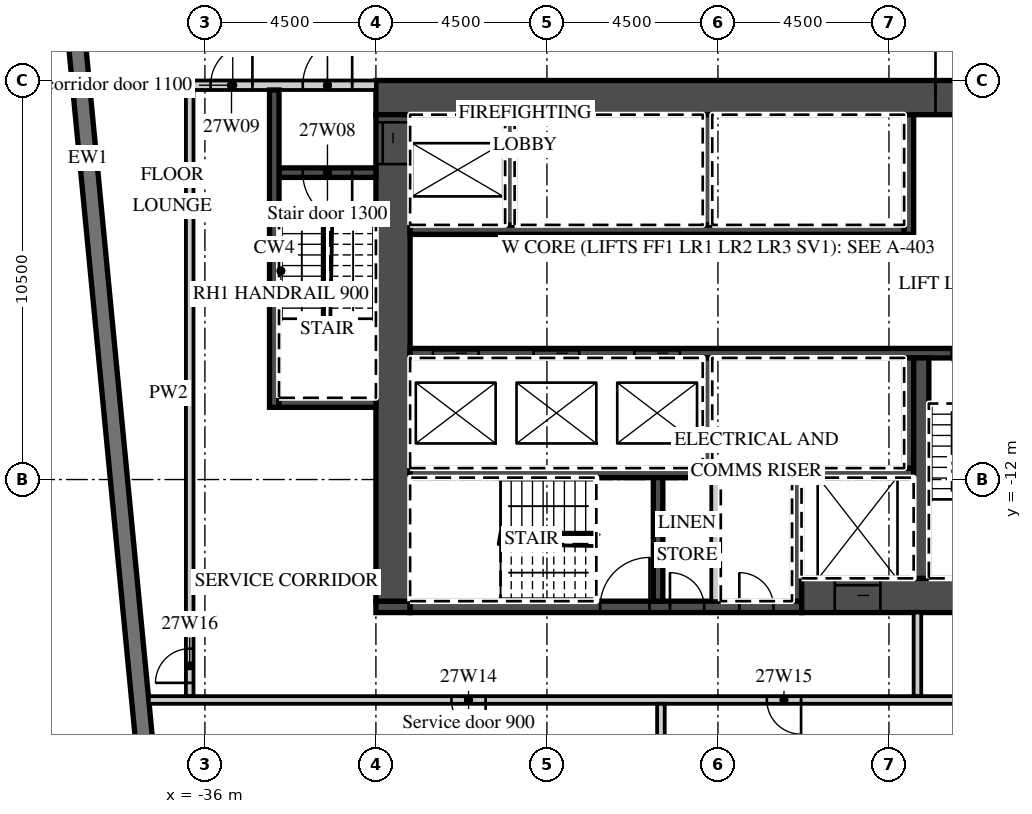
"""IFC4 building model, lengths in metres.
Left out: names, types, materials, properties, quantities, classifications, styles, units other than length and angle.
Written with IfcOpenShell. Run it as: python <this file> out.ifc"""

import sys

from ifc_helpers import new_model, si_unit, direction, frame, frame_2d, origin, place, context, subcontext, project, spatial, rectangle, extrude, element, fill, save


model = new_model("IFC4")
c1 = context("Model", 3, precision=1e-05, world=origin(), true_north=direction((0.0, 1.0)))
c2 = subcontext(c1, "Body", "Model", "MODEL_VIEW")
j1 = project(units=[si_unit("LENGTHUNIT", "METRE"), si_unit("PLANEANGLEUNIT", "RADIAN")], contexts=[c1])
p1 = place(None, origin())
s1 = spatial("IfcSite", under=j1, at=p1, CompositionType="ELEMENT")
p2 = place(p1, origin())
s2 = spatial("IfcBuilding", under=s1, at=p2, CompositionType="ELEMENT")
p3 = place(p2, frame((0.0, 0.0, 124.0)))
s3 = spatial("IfcBuildingStorey", under=s2, at=p3, CompositionType="ELEMENT", Elevation=124.0)
p4 = place(p3, frame((-40.753, 13.872, 0.0), z_axis=(0.0, 0.0, 1.0), x_axis=(0.095843327381, -0.995396431878, 0.0)))
e1 = element("IfcWall", 1, at=p4, inside=s3, PredefinedType="SOLIDWALL", context=c2, shape_type="SweptSolid", body=[
    extrude(rectangle(XDim=35.0, YDim=0.45, at=frame_2d((17.5, 0.0))), origin(), (0.0, 0.0, 1.0), 3.02),
])
p5 = place(p4, frame((4.277, 0.0, 0.45)))
e2 = element("IfcOpeningElement", 2, at=p5, cuts=e1, PredefinedType="OPENING", context=c2, shape_type="SweptSolid", body=[
    extrude(rectangle(XDim=3.3, YDim=2.25, at=frame_2d((1.65, 1.125))), frame((0.0, 0.235, 0.0), z_axis=(0.0, -1.0, 0.0), x_axis=(1.0, 0.0, 0.0)), (0.0, 0.0, 1.0), 0.47),
])
p6 = place(p4, frame((8.798, 0.0, 0.45)))
e3 = element("IfcOpeningElement", 3, at=p6, cuts=e1, PredefinedType="OPENING", context=c2, shape_type="SweptSolid", body=[
    extrude(rectangle(XDim=3.3, YDim=2.25, at=frame_2d((1.65, 1.125))), frame((0.0, 0.235, 0.0), z_axis=(0.0, -1.0, 0.0), x_axis=(1.0, 0.0, 0.0)), (0.0, 0.0, 1.0), 0.47),
])
p7 = place(p3, frame((-31.5, -1.95, 0.0), z_axis=(0.0, 0.0, 1.0), x_axis=(1.0, 0.0, 0.0)))
e4 = element("IfcWall", 4, at=p7, inside=s3, PredefinedType="SHEAR", context=c2, shape_type="SweptSolid", body=[
    extrude(rectangle(XDim=18.0, YDim=0.9, at=frame_2d((9.0, 0.0))), origin(), (0.0, 0.0, 1.0), 3.02),
])
p8 = place(p7, frame((14.725, 0.0, 0.0)))
e5 = element("IfcOpeningElement", 5, at=p8, cuts=e4, PredefinedType="OPENING", context=c2, shape_type="SweptSolid", body=[
    extrude(rectangle(XDim=1.8, YDim=2.1, at=frame_2d((0.9, 1.05))), frame((0.0, 0.46, 0.0), z_axis=(0.0, -1.0, 0.0), x_axis=(1.0, 0.0, 0.0)), (0.0, 0.0, 1.0), 0.92),
])
p9 = place(p3, frame((-20.3, -15.05, 0.0), z_axis=(0.0, 0.0, 1.0), x_axis=(1.0, 0.0, 0.0)))
e6 = element("IfcWall", 6, at=p9, inside=s3, PredefinedType="SHEAR", context=c2, shape_type="SweptSolid", body=[
    extrude(rectangle(XDim=6.8, YDim=0.9, at=frame_2d((3.4, 0.0))), origin(), (0.0, 0.0, 1.0), 3.02),
])
p10 = place(p9, frame((0.875, 0.0, 0.0)))
e7 = element("IfcOpeningElement", 7, at=p10, cuts=e6, PredefinedType="OPENING", context=c2, shape_type="SweptSolid", body=[
    extrude(rectangle(XDim=1.2, YDim=2.1, at=frame_2d((0.6, 1.05))), frame((0.0, 0.46, 0.0), z_axis=(0.0, -1.0, 0.0), x_axis=(1.0, 0.0, 0.0)), (0.0, 0.0, 1.0), 0.92),
])
p11 = place(p3, frame((-31.5, -15.35, 0.0), z_axis=(0.0, 0.0, 1.0), x_axis=(1.0, 0.0, 0.0)))
e8 = element("IfcWall", 8, at=p11, inside=s3, PredefinedType="SHEAR", context=c2, shape_type="SweptSolid", body=[
    extrude(rectangle(XDim=0.9, YDim=0.3, at=frame_2d((0.45, 0.0))), origin(), (0.0, 0.0, 1.0), 3.02),
])
p12 = place(p3, frame((-30.6, -15.35, 0.0), z_axis=(0.0, 0.0, 1.0), x_axis=(1.0, 0.0, 0.0)))
e9 = element("IfcWall", 9, at=p12, inside=s3, PredefinedType="SHEAR", context=c2, shape_type="SweptSolid", body=[
    extrude(rectangle(XDim=10.3, YDim=0.3, at=frame_2d((5.15, 0.0))), origin(), (0.0, 0.0, 1.0), 3.02),
])
p13 = place(p12, frame((5.0, 0.0, 0.0)))
e10 = element("IfcOpeningElement", 10, at=p13, cuts=e9, PredefinedType="OPENING", context=c2, shape_type="SweptSolid", body=[
    extrude(rectangle(XDim=1.3, YDim=2.1, at=frame_2d((0.65, 1.05))), frame((0.0, 0.16, 0.0), z_axis=(0.0, -1.0, 0.0), x_axis=(1.0, 0.0, 0.0)), (0.0, 0.0, 1.0), 0.32),
])
p14 = place(p12, frame((6.837, 0.0, 0.0)))
e11 = element("IfcOpeningElement", 11, at=p14, cuts=e9, PredefinedType="OPENING", context=c2, shape_type="SweptSolid", body=[
    extrude(rectangle(XDim=0.9, YDim=2.1, at=frame_2d((0.45, 1.05))), frame((0.0, 0.16, 0.0), z_axis=(0.0, -1.0, 0.0), x_axis=(1.0, 0.0, 0.0)), (0.0, 0.0, 1.0), 0.32),
])
p15 = place(p12, frame((8.663, 0.0, 0.0)))
e12 = element("IfcOpeningElement", 12, at=p15, cuts=e9, PredefinedType="OPENING", context=c2, shape_type="SweptSolid", body=[
    extrude(rectangle(XDim=0.9, YDim=2.1, at=frame_2d((0.45, 1.05))), frame((0.0, 0.16, 0.0), z_axis=(0.0, -1.0, 0.0), x_axis=(1.0, 0.0, 0.0)), (0.0, 0.0, 1.0), 0.32),
])
p16 = place(p3, frame((-31.05, -15.2, 0.0), z_axis=(0.0, 0.0, 1.0), x_axis=(0.0, 1.0, 0.0)))
e13 = element("IfcWall", 13, at=p16, inside=s3, PredefinedType="SHEAR", context=c2, shape_type="SweptSolid", body=[
    extrude(rectangle(XDim=12.8, YDim=0.9, at=frame_2d((6.4, 0.0))), origin(), (0.0, 0.0, 1.0), 3.02),
])
p17 = place(p16, frame((11.5, 0.0, 0.0)))
e14 = element("IfcOpeningElement", 14, at=p17, cuts=e13, PredefinedType="OPENING", context=c2, shape_type="SweptSolid", body=[
    extrude(rectangle(XDim=1.1, YDim=2.1, at=frame_2d((0.55, 1.05))), frame((0.0, 0.46, 0.0), z_axis=(0.0, -1.0, 0.0), x_axis=(1.0, 0.0, 0.0)), (0.0, 0.0, 1.0), 0.92),
])
p18 = place(p3, frame((-30.6, -5.425, 0.0), z_axis=(0.0, 0.0, 1.0), x_axis=(1.0, 0.0, 0.0)))
e15 = element("IfcWall", 15, at=p18, inside=s3, PredefinedType="SHEAR", context=c2, shape_type="SweptSolid", body=[
    extrude(rectangle(XDim=13.0, YDim=0.25, at=frame_2d((6.5, 0.0))), origin(), (0.0, 0.0, 1.0), 3.02),
])
p19 = place(p3, frame((-17.475, -5.55, 0.0), z_axis=(0.0, 0.0, 1.0), x_axis=(0.0, 1.0, 0.0)))
e16 = element("IfcWall", 16, at=p19, inside=s3, PredefinedType="SHEAR", context=c2, shape_type="SweptSolid", body=[
    extrude(rectangle(XDim=3.15, YDim=0.25, at=frame_2d((1.575, 0.0))), origin(), (0.0, 0.0, 1.0), 3.02),
])
for number, where, z_axis, x_axis in (
    (17, (-27.975, -5.3, 0.0), (0.0, 0.0, 1.0), (0.0, 1.0, 0.0)),
    (18, (-22.775, -5.3, 0.0), (0.0, 0.0, 1.0), (0.0, 1.0, 0.0)),
):
    element("IfcWall", number, at=place(p3, frame(where, z_axis=z_axis, x_axis=x_axis)), inside=s3, PredefinedType="SHEAR", context=c2, shape_type="SweptSolid", body=[
        extrude(rectangle(XDim=2.9, YDim=0.25, at=frame_2d((1.45, 0.0))), origin(), (0.0, 0.0, 1.0), 3.02),
    ])
p20 = place(p3, frame((-30.6, -8.675, 0.0), z_axis=(0.0, 0.0, 1.0), x_axis=(1.0, 0.0, 0.0)))
e19 = element("IfcWall", 19, at=p20, inside=s3, PredefinedType="SHEAR", context=c2, shape_type="SweptSolid", body=[
    extrude(rectangle(XDim=16.2, YDim=0.25, at=frame_2d((8.1, 0.0))), origin(), (0.0, 0.0, 1.0), 3.02),
])
p21 = place(p20, frame((0.6, 0.0, 0.0)))
e20 = element("IfcOpeningElement", 20, at=p21, cuts=e19, PredefinedType="OPENING", context=c2, shape_type="SweptSolid", body=[
    extrude(rectangle(XDim=1.2, YDim=2.1, at=frame_2d((0.6, 1.05))), frame((0.0, 0.135, 0.0), z_axis=(0.0, -1.0, 0.0), x_axis=(1.0, 0.0, 0.0)), (0.0, 0.0, 1.0), 0.27),
])
p22 = place(p20, frame((3.25, 0.0, 0.0)))
e21 = element("IfcOpeningElement", 21, at=p22, cuts=e19, PredefinedType="OPENING", context=c2, shape_type="SweptSolid", body=[
    extrude(rectangle(XDim=1.2, YDim=2.1, at=frame_2d((0.6, 1.05))), frame((0.0, 0.135, 0.0), z_axis=(0.0, -1.0, 0.0), x_axis=(1.0, 0.0, 0.0)), (0.0, 0.0, 1.0), 0.27),
])
p23 = place(p20, frame((5.9, 0.0, 0.0)))
e22 = element("IfcOpeningElement", 22, at=p23, cuts=e19, PredefinedType="OPENING", context=c2, shape_type="SweptSolid", body=[
    extrude(rectangle(XDim=1.2, YDim=2.1, at=frame_2d((0.6, 1.05))), frame((0.0, 0.135, 0.0), z_axis=(0.0, -1.0, 0.0), x_axis=(1.0, 0.0, 0.0)), (0.0, 0.0, 1.0), 0.27),
])
p24 = place(p20, frame((14.25, 0.0, 0.0)))
e23 = element("IfcOpeningElement", 23, at=p24, cuts=e19, PredefinedType="OPENING", context=c2, shape_type="SweptSolid", body=[
    extrude(rectangle(XDim=1.3, YDim=2.1, at=frame_2d((0.65, 1.05))), frame((0.0, 0.135, 0.0), z_axis=(0.0, -1.0, 0.0), x_axis=(1.0, 0.0, 0.0)), (0.0, 0.0, 1.0), 0.27),
])
p25 = place(p3, frame((-30.6, -11.825, 0.0), z_axis=(0.0, 0.0, 1.0), x_axis=(1.0, 0.0, 0.0)))
e24 = element("IfcWall", 24, at=p25, inside=s3, PredefinedType="SHEAR", context=c2, shape_type="SweptSolid", body=[
    extrude(rectangle(XDim=13.25, YDim=0.25, at=frame_2d((6.625, 0.0))), origin(), (0.0, 0.0, 1.0), 3.02),
])
for number, where, z_axis, x_axis in (
    (25, (-17.475, -11.7, 0.0), (0.0, 0.0, 1.0), (0.0, 1.0, 0.0)),
    (26, (-22.775, -11.7, 0.0), (0.0, 0.0, 1.0), (0.0, 1.0, 0.0)),
):
    element("IfcWall", number, at=place(p3, frame(where, z_axis=z_axis, x_axis=x_axis)), inside=s3, PredefinedType="SHEAR", context=c2, shape_type="SweptSolid", body=[
        extrude(rectangle(XDim=2.9, YDim=0.25, at=frame_2d((1.45, 0.0))), origin(), (0.0, 0.0, 1.0), 3.02),
    ])
p26 = place(p3, frame((-17.15, -14.6, 0.0), z_axis=(0.0, 0.0, 1.0), x_axis=(0.0, 1.0, 0.0)))
e27 = element("IfcWall", 27, at=p26, inside=s3, PredefinedType="SHEAR", context=c2, shape_type="SweptSolid", body=[
    extrude(rectangle(XDim=5.8, YDim=0.4, at=frame_2d((2.9, 0.0))), origin(), (0.0, 0.0, 1.0), 3.02),
])
for number, where, z_axis, x_axis in (
    (28, (-20.425, -15.2, 0.0), (0.0, 0.0, 1.0), (0.0, 1.0, 0.0)),
    (29, (-24.075, -15.2, 0.0), (0.0, 0.0, 1.0), (0.0, 1.0, 0.0)),
):
    element("IfcWall", number, at=place(p3, frame(where, z_axis=z_axis, x_axis=x_axis)), inside=s3, PredefinedType="SHEAR", context=c2, shape_type="SweptSolid", body=[
        extrude(rectangle(XDim=3.25, YDim=0.25, at=frame_2d((1.625, 0.0))), origin(), (0.0, 0.0, 1.0), 3.02),
    ])
p27 = place(p3, frame((-22.55, -15.2, 0.0), z_axis=(0.0, 0.0, 1.0), x_axis=(0.0, 1.0, 0.0)))
e30 = element("IfcWall", 30, at=p27, inside=s3, PredefinedType="PARTITIONING", context=c2, shape_type="SweptSolid", body=[
    extrude(rectangle(XDim=3.25, YDim=0.25, at=frame_2d((1.625, 0.0))), origin(), (0.0, 0.0, 1.0), 3.02),
])
p28 = place(p3, frame((-39.035, -1.625, 0.0), z_axis=(0.0, 0.0, 1.0), x_axis=(1.0, 0.0, 0.0)))
e31 = element("IfcWall", 31, at=p28, inside=s3, PredefinedType="PARTITIONING", context=c2, shape_type="SweptSolid", body=[
    extrude(rectangle(XDim=7.535, YDim=0.25, at=frame_2d((3.768, 0.0))), origin(), (0.0, 0.0, 1.0), 3.02),
])
p29 = place(p28, frame((5.61, 0.0, 0.0)))
e32 = element("IfcOpeningElement", 32, at=p29, cuts=e31, PredefinedType="OPENING", context=c2, shape_type="SweptSolid", body=[
    extrude(rectangle(XDim=1.3, YDim=2.1, at=frame_2d((0.65, 1.05))), frame((0.0, 0.135, 0.0), z_axis=(0.0, -1.0, 0.0), x_axis=(1.0, 0.0, 0.0)), (0.0, 0.0, 1.0), 0.27),
])
p30 = place(p28, frame((3.185, 0.0, 0.0)))
e33 = element("IfcOpeningElement", 33, at=p30, cuts=e31, PredefinedType="OPENING", context=c2, shape_type="SweptSolid", body=[
    extrude(rectangle(XDim=1.1, YDim=2.1, at=frame_2d((0.55, 1.05))), frame((0.0, 0.135, 0.0), z_axis=(0.0, -1.0, 0.0), x_axis=(1.0, 0.0, 0.0)), (0.0, 0.0, 1.0), 0.27),
])
p31 = place(p3, frame((-34.05, -3.925, 0.0), z_axis=(0.0, 0.0, 1.0), x_axis=(1.0, 0.0, 0.0)))
e34 = element("IfcWall", 34, at=p31, inside=s3, PredefinedType="SHEAR", context=c2, shape_type="SweptSolid", body=[
    extrude(rectangle(XDim=2.55, YDim=0.25, at=frame_2d((1.275, 0.0))), origin(), (0.0, 0.0, 1.0), 3.02),
])
p32 = place(p31, frame((0.625, 0.0, 0.0)))
e35 = element("IfcOpeningElement", 35, at=p32, cuts=e34, PredefinedType="OPENING", context=c2, shape_type="SweptSolid", body=[
    extrude(rectangle(XDim=1.3, YDim=2.1, at=frame_2d((0.65, 1.05))), frame((0.0, 0.135, 0.0), z_axis=(0.0, -1.0, 0.0), x_axis=(1.0, 0.0, 0.0)), (0.0, 0.0, 1.0), 0.27),
])
p33 = place(p3, frame((-34.175, -10.1, 0.0), z_axis=(0.0, 0.0, 1.0), x_axis=(0.0, 1.0, 0.0)))
e36 = element("IfcWall", 36, at=p33, inside=s3, PredefinedType="SHEAR", context=c2, shape_type="SweptSolid", body=[
    extrude(rectangle(XDim=8.35, YDim=0.25, at=frame_2d((4.175, 0.0))), origin(), (0.0, 0.0, 1.0), 3.02),
])
p34 = place(p3, frame((-34.05, -9.975, 0.0), z_axis=(0.0, 0.0, 1.0), x_axis=(1.0, 0.0, 0.0)))
e37 = element("IfcWall", 37, at=p34, inside=s3, PredefinedType="SHEAR", context=c2, shape_type="SweptSolid", body=[
    extrude(rectangle(XDim=2.55, YDim=0.25, at=frame_2d((1.275, 0.0))), origin(), (0.0, 0.0, 1.0), 3.02),
])
p35 = place(p3, frame((-17.25, -17.7, 0.0), z_axis=(0.0, 0.0, 1.0), x_axis=(0.0, 1.0, 0.0)))
e38 = element("IfcWall", 38, at=p35, inside=s3, PredefinedType="PARTITIONING", context=c2, shape_type="SweptSolid", body=[
    extrude(rectangle(XDim=2.2, YDim=0.2, at=frame_2d((1.1, 0.0))), origin(), (0.0, 0.0, 1.0), 3.02),
])
p36 = place(p3, frame((-36.4, -17.7, 0.0), z_axis=(0.0, 0.0, 1.0), x_axis=(0.0, 1.0, 0.0)))
e39 = element("IfcWall", 39, at=p36, inside=s3, PredefinedType="PARTITIONING", context=c2, shape_type="SweptSolid", body=[
    extrude(rectangle(XDim=15.95, YDim=0.2, at=frame_2d((7.975, 0.0))), origin(), (0.0, 0.0, 1.0), 3.02),
])
p37 = place(p36, frame((0.35, 0.0, 0.0)))
e40 = element("IfcOpeningElement", 40, at=p37, cuts=e39, PredefinedType="OPENING", context=c2, shape_type="SweptSolid", body=[
    extrude(rectangle(XDim=0.9, YDim=2.1, at=frame_2d((0.45, 1.05))), frame((0.0, 0.11, 0.0), z_axis=(0.0, -1.0, 0.0), x_axis=(1.0, 0.0, 0.0)), (0.0, 0.0, 1.0), 0.22),
])
p38 = place(p3, frame((-37.477, -17.8, 0.0), z_axis=(0.0, 0.0, 1.0), x_axis=(1.0, 0.0, 0.0)))
e41 = element("IfcWall", 41, at=p38, inside=s3, PredefinedType="PARTITIONING", context=c2, shape_type="SweptSolid", body=[
    extrude(rectangle(XDim=23.877, YDim=0.2, at=frame_2d((11.938, 0.0))), origin(), (0.0, 0.0, 1.0), 3.02),
])
p39 = place(p38, frame((7.965, 0.0, 0.0)))
e42 = element("IfcOpeningElement", 42, at=p39, cuts=e41, PredefinedType="OPENING", context=c2, shape_type="SweptSolid", body=[
    extrude(rectangle(XDim=0.9, YDim=2.1, at=frame_2d((0.45, 1.05))), frame((0.0, 0.11, 0.0), z_axis=(0.0, -1.0, 0.0), x_axis=(1.0, 0.0, 0.0)), (0.0, 0.0, 1.0), 0.22),
])
p40 = place(p38, frame((16.265, 0.0, 0.0)))
e43 = element("IfcOpeningElement", 43, at=p40, cuts=e41, PredefinedType="OPENING", context=c2, shape_type="SweptSolid", body=[
    extrude(rectangle(XDim=0.9, YDim=2.1, at=frame_2d((0.45, 1.05))), frame((0.0, 0.11, 0.0), z_axis=(0.0, -1.0, 0.0), x_axis=(1.0, 0.0, 0.0)), (0.0, 0.0, 1.0), 0.22),
])
p41 = place(p3, frame((-24.0, -23.244, 0.0), z_axis=(0.0, 0.0, 1.0), x_axis=(0.0, 1.0, 0.0)))
e44 = element("IfcWall", 44, at=p41, inside=s3, PredefinedType="PARTITIONING", context=c2, shape_type="SweptSolid", body=[
    extrude(rectangle(XDim=5.344, YDim=0.2, at=frame_2d((2.672, 0.0))), origin(), (0.0, 0.0, 1.0), 3.02),
])
p42 = place(p21, origin())
e45 = element("IfcDoor", 45, at=p42, inside=s3, OperationType="SLIDING_TO_LEFT", PredefinedType="DOOR", context=c2, shape_type="SweptSolid", body=[
    extrude(rectangle(XDim=1.2, YDim=2.1, at=frame_2d((0.6, 1.05))), frame((0.0, 0.025, 0.0), z_axis=(0.0, -1.0, 0.0), x_axis=(1.0, 0.0, 0.0)), (0.0, 0.0, 1.0), 0.05),
])
fill(e20, e45)
p43 = place(p22, origin())
e46 = element("IfcDoor", 46, at=p43, inside=s3, OperationType="SLIDING_TO_RIGHT", PredefinedType="DOOR", context=c2, shape_type="SweptSolid", body=[
    extrude(rectangle(XDim=1.2, YDim=2.1, at=frame_2d((0.6, 1.05))), frame((0.0, 0.025, 0.0), z_axis=(0.0, -1.0, 0.0), x_axis=(1.0, 0.0, 0.0)), (0.0, 0.0, 1.0), 0.05),
])
fill(e21, e46)
p44 = place(p23, origin())
e47 = element("IfcDoor", 47, at=p44, inside=s3, OperationType="SLIDING_TO_RIGHT", PredefinedType="DOOR", context=c2, shape_type="SweptSolid", body=[
    extrude(rectangle(XDim=1.2, YDim=2.1, at=frame_2d((0.6, 1.05))), frame((0.0, 0.025, 0.0), z_axis=(0.0, -1.0, 0.0), x_axis=(1.0, 0.0, 0.0)), (0.0, 0.0, 1.0), 0.05),
])
fill(e22, e47)
p45 = place(p10, origin())
e48 = element("IfcDoor", 48, at=p45, inside=s3, OperationType="SLIDING_TO_LEFT", PredefinedType="DOOR", context=c2, shape_type="SweptSolid", body=[
    extrude(rectangle(XDim=1.2, YDim=2.1, at=frame_2d((0.6, 1.05))), frame((0.0, 0.025, 0.0), z_axis=(0.0, -1.0, 0.0), x_axis=(1.0, 0.0, 0.0)), (0.0, 0.0, 1.0), 0.05),
])
fill(e7, e48)
p46 = place(p17, origin())
e49 = element("IfcDoor", 49, at=p46, inside=s3, OperationType="SLIDING_TO_RIGHT", PredefinedType="DOOR", context=c2, shape_type="SweptSolid", body=[
    extrude(rectangle(XDim=1.1, YDim=2.1, at=frame_2d((0.55, 1.05))), frame((0.0, 0.025, 0.0), z_axis=(0.0, -1.0, 0.0), x_axis=(1.0, 0.0, 0.0)), (0.0, 0.0, 1.0), 0.05),
])
fill(e14, e49)
p47 = place(p8, origin())
e50 = element("IfcDoor", 50, at=p47, inside=s3, OperationType="DOUBLE_DOOR_DOUBLE_SWING", PredefinedType="DOOR", context=c2, shape_type="SweptSolid", body=[
    extrude(rectangle(XDim=1.8, YDim=2.1, at=frame_2d((0.9, 1.05))), frame((0.0, 0.025, 0.0), z_axis=(0.0, -1.0, 0.0), x_axis=(1.0, 0.0, 0.0)), (0.0, 0.0, 1.0), 0.05),
])
fill(e5, e50)
p48 = place(p29, origin())
e51 = element("IfcDoor", 51, at=p48, inside=s3, OperationType="SINGLE_SWING_RIGHT", PredefinedType="DOOR", context=c2, shape_type="SweptSolid", body=[
    extrude(rectangle(XDim=1.3, YDim=2.1, at=frame_2d((0.65, 1.05))), frame((0.0, 0.025, 0.0), z_axis=(0.0, -1.0, 0.0), x_axis=(1.0, 0.0, 0.0)), (0.0, 0.0, 1.0), 0.05),
])
fill(e32, e51)
p49 = place(p32, origin())
e52 = element("IfcDoor", 52, at=p49, inside=s3, OperationType="SINGLE_SWING_RIGHT", PredefinedType="DOOR", context=c2, shape_type="SweptSolid", body=[
    extrude(rectangle(XDim=1.3, YDim=2.1, at=frame_2d((0.65, 1.05))), frame((0.0, 0.025, 0.0), z_axis=(0.0, -1.0, 0.0), x_axis=(1.0, 0.0, 0.0)), (0.0, 0.0, 1.0), 0.05),
])
fill(e35, e52)
p50 = place(p30, origin())
e53 = element("IfcDoor", 53, at=p50, inside=s3, OperationType="SINGLE_SWING_RIGHT", PredefinedType="DOOR", context=c2, shape_type="SweptSolid", body=[
    extrude(rectangle(XDim=1.1, YDim=2.1, at=frame_2d((0.55, 1.05))), frame((0.0, 0.025, 0.0), z_axis=(0.0, -1.0, 0.0), x_axis=(1.0, 0.0, 0.0)), (0.0, 0.0, 1.0), 0.05),
])
fill(e33, e53)
p51 = place(p24, origin())
e54 = element("IfcDoor", 54, at=p51, inside=s3, OperationType="SINGLE_SWING_RIGHT", PredefinedType="DOOR", context=c2, shape_type="SweptSolid", body=[
    extrude(rectangle(XDim=1.3, YDim=2.1, at=frame_2d((0.65, 1.05))), frame((0.0, 0.025, 0.0), z_axis=(0.0, -1.0, 0.0), x_axis=(1.0, 0.0, 0.0)), (0.0, 0.0, 1.0), 0.05),
])
fill(e23, e54)
p52 = place(p13, origin())
e55 = element("IfcDoor", 55, at=p52, inside=s3, OperationType="SINGLE_SWING_RIGHT", PredefinedType="DOOR", context=c2, shape_type="SweptSolid", body=[
    extrude(rectangle(XDim=1.3, YDim=2.1, at=frame_2d((0.65, 1.05))), frame((0.0, 0.025, 0.0), z_axis=(0.0, -1.0, 0.0), x_axis=(1.0, 0.0, 0.0)), (0.0, 0.0, 1.0), 0.05),
])
fill(e10, e55)
p53 = place(p14, origin())
e56 = element("IfcDoor", 56, at=p53, inside=s3, OperationType="SINGLE_SWING_LEFT", PredefinedType="DOOR", context=c2, shape_type="SweptSolid", body=[
    extrude(rectangle(XDim=0.9, YDim=2.1, at=frame_2d((0.45, 1.05))), frame((0.0, 0.025, 0.0), z_axis=(0.0, -1.0, 0.0), x_axis=(1.0, 0.0, 0.0)), (0.0, 0.0, 1.0), 0.05),
])
fill(e11, e56)
p54 = place(p15, origin())
e57 = element("IfcDoor", 57, at=p54, inside=s3, OperationType="SINGLE_SWING_LEFT", PredefinedType="DOOR", context=c2, shape_type="SweptSolid", body=[
    extrude(rectangle(XDim=0.9, YDim=2.1, at=frame_2d((0.45, 1.05))), frame((0.0, 0.025, 0.0), z_axis=(0.0, -1.0, 0.0), x_axis=(1.0, 0.0, 0.0)), (0.0, 0.0, 1.0), 0.05),
])
fill(e12, e57)
p55 = place(p39, origin())
e58 = element("IfcDoor", 58, at=p55, inside=s3, OperationType="SINGLE_SWING_RIGHT", PredefinedType="DOOR", context=c2, shape_type="SweptSolid", body=[
    extrude(rectangle(XDim=0.9, YDim=2.1, at=frame_2d((0.45, 1.05))), frame((0.0, 0.025, 0.0), z_axis=(0.0, -1.0, 0.0), x_axis=(1.0, 0.0, 0.0)), (0.0, 0.0, 1.0), 0.05),
])
fill(e42, e58)
p56 = place(p40, origin())
e59 = element("IfcDoor", 59, at=p56, inside=s3, OperationType="SINGLE_SWING_RIGHT", PredefinedType="DOOR", context=c2, shape_type="SweptSolid", body=[
    extrude(rectangle(XDim=0.9, YDim=2.1, at=frame_2d((0.45, 1.05))), frame((0.0, 0.025, 0.0), z_axis=(0.0, -1.0, 0.0), x_axis=(1.0, 0.0, 0.0)), (0.0, 0.0, 1.0), 0.05),
])
fill(e43, e59)
p57 = place(p37, origin())
e60 = element("IfcDoor", 60, at=p57, inside=s3, OperationType="SINGLE_SWING_LEFT", PredefinedType="DOOR", context=c2, shape_type="SweptSolid", body=[
    extrude(rectangle(XDim=0.9, YDim=2.1, at=frame_2d((0.45, 1.05))), frame((0.0, 0.025, 0.0), z_axis=(0.0, -1.0, 0.0), x_axis=(1.0, 0.0, 0.0)), (0.0, 0.0, 1.0), 0.05),
])
fill(e40, e60)
save(model, sys.argv[1])
